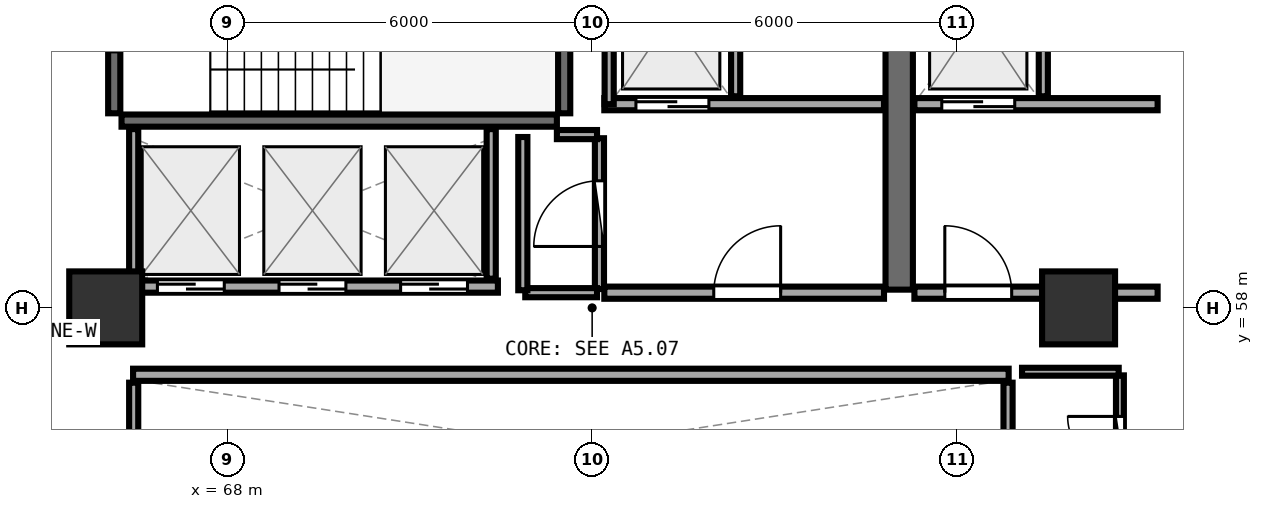
"""IFC4 building model, lengths in metres.
Left out: names, types, materials, properties, quantities, classifications, styles, units other than length and angle.
Written with IfcOpenShell. Run it as: python <this file> out.ifc"""

import sys

from ifc_helpers import new_model, si_unit, direction, frame, frame_2d, origin, origin_2d, place, context, subcontext, project, spatial, rectangle, extrude, element, fill, save


model = new_model("IFC4")
c1 = context("Model", 3, precision=1e-05, world=origin(), true_north=direction((0.0, 1.0)))
c2 = subcontext(c1, "Body", "Model", "MODEL_VIEW")
j1 = project(units=[si_unit("LENGTHUNIT", "METRE"), si_unit("PLANEANGLEUNIT", "RADIAN")], contexts=[c1])
p1 = place(None, origin())
s1 = spatial("IfcSite", under=j1, at=p1, CompositionType="ELEMENT")
p2 = place(p1, origin())
s2 = spatial("IfcBuilding", under=s1, at=p2, CompositionType="ELEMENT")
p3 = place(p2, frame((0.0, 0.0, 113.85)))
s3 = spatial("IfcBuildingStorey", under=s2, at=p3, CompositionType="ELEMENT", Elevation=113.85)
for number, where, z_axis, x_axis in (
    (1, (82.0, 58.0, 0.0), (0.0, 0.0, 1.0), (1.0, 0.0, 0.0)),
    (2, (66.0, 58.0, 0.0), (0.0, 0.0, 1.0), (1.0, 0.0, 0.0)),
):
    element("IfcColumn", number, at=place(p3, frame(where, z_axis=z_axis, x_axis=x_axis)), inside=s3, PredefinedType="PILASTER", context=c2, shape_type="SweptSolid", body=[
        extrude(rectangle(XDim=1.2, YDim=1.2, at=origin_2d()), origin(), (0.0, 0.0, 1.0), 3.75),
    ])
p4 = place(p3, frame((66.26, 61.08, 0.0), z_axis=(0.0, 0.0, 1.0), x_axis=(1.0, 0.0, 0.0)))
e3 = element("IfcWall", 3, at=p4, inside=s3, PredefinedType="SHEAR", context=c2, shape_type="SweptSolid", body=[
    extrude(rectangle(XDim=7.16, YDim=0.2, at=frame_2d((3.58, 0.0))), origin(), (0.0, 0.0, 1.0), 3.49),
])
p5 = place(p3, frame((73.54, 61.2, 0.0), z_axis=(0.0, 0.0, 1.0), x_axis=(0.0, 1.0, 0.0)))
e4 = element("IfcWall", 4, at=p5, inside=s3, PredefinedType="SHEAR", context=c2, shape_type="SweptSolid", body=[
    extrude(rectangle(XDim=3.07, YDim=0.2, at=frame_2d((1.535, 0.0))), origin(), (0.0, 0.0, 1.0), 3.49),
])
p6 = place(p3, frame((66.14, 64.27, 0.0), z_axis=(0.0, 0.0, 1.0), x_axis=(0.0, -1.0, 0.0)))
e5 = element("IfcWall", 5, at=p6, inside=s3, PredefinedType="SHEAR", context=c2, shape_type="SweptSolid", body=[
    extrude(rectangle(XDim=3.07, YDim=0.2, at=frame_2d((1.535, 0.0))), origin(), (0.0, 0.0, 1.0), 3.49),
])
p7 = place(p6, frame((1.01, 0.0, 0.0)))
e6 = element("IfcOpeningElement", 6, at=p7, cuts=e5, PredefinedType="OPENING", context=c2, shape_type="SweptSolid", body=[
    extrude(rectangle(XDim=1.05, YDim=2.1, at=frame_2d((0.525, 1.05))), frame((0.0, 0.11, 0.0), z_axis=(0.0, -1.0, 0.0), x_axis=(1.0, 0.0, 0.0)), (0.0, 0.0, 1.0), 0.22),
])
p8 = place(p3, frame((79.05, 58.3, 0.0), z_axis=(0.0, 0.0, 1.0), x_axis=(0.0, 1.0, 0.0)))
e7 = element("IfcWall", 7, at=p8, inside=s3, PredefinedType="SHEAR", context=c2, shape_type="SweptSolid", body=[
    extrude(rectangle(XDim=6.3, YDim=0.45, at=frame_2d((3.15, 0.0))), origin(), (0.0, 0.0, 1.0), 3.49),
])
p9 = place(p3, frame((74.2, 61.35, 0.0), z_axis=(0.0, 0.0, 1.0), x_axis=(1.0, 0.0, 0.0)))
e8 = element("IfcWall", 8, at=p9, inside=s3, PredefinedType="SOLIDWALL", context=c2, shape_type="SweptSolid", body=[
    extrude(rectangle(XDim=4.6, YDim=0.2, at=frame_2d((2.3, 0.0))), origin(), (0.0, 0.0, 1.0), 3.48),
])
p10 = place(p9, frame((0.52, 0.0, 0.0)))
e9 = element("IfcOpeningElement", 9, at=p10, cuts=e8, PredefinedType="OPENING", context=c2, shape_type="SweptSolid", body=[
    extrude(rectangle(XDim=1.2, YDim=2.15, at=frame_2d((0.6, 1.075))), frame((0.0, 0.11, 0.0), z_axis=(0.0, -1.0, 0.0), x_axis=(1.0, 0.0, 0.0)), (0.0, 0.0, 1.0), 0.22),
])
p11 = place(p3, frame((74.28, 61.35, 0.0), z_axis=(0.0, 0.0, 1.0), x_axis=(0.0, 1.0, 0.0)))
e10 = element("IfcWall", 10, at=p11, inside=s3, PredefinedType="PARTITIONING", context=c2, shape_type="SweptSolid", body=[
    extrude(rectangle(XDim=2.97, YDim=0.15, at=frame_2d((1.485, 0.0))), origin(), (0.0, 0.0, 1.0), 3.48),
])
p12 = place(p3, frame((76.36, 61.48, 0.0), z_axis=(0.0, 0.0, 1.0), x_axis=(0.0, 1.0, 0.0)))
e11 = element("IfcWall", 11, at=p12, inside=s3, PredefinedType="PARTITIONING", context=c2, shape_type="SweptSolid", body=[
    extrude(rectangle(XDim=2.84, YDim=0.15, at=frame_2d((1.42, 0.0))), origin(), (0.0, 0.0, 1.0), 3.48),
])
p13 = place(p3, frame((79.3, 61.35, 0.0), z_axis=(0.0, 0.0, 1.0), x_axis=(1.0, 0.0, 0.0)))
e12 = element("IfcWall", 12, at=p13, inside=s3, PredefinedType="SOLIDWALL", context=c2, shape_type="SweptSolid", body=[
    extrude(rectangle(XDim=4.0, YDim=0.2, at=frame_2d((2.0, 0.0))), origin(), (0.0, 0.0, 1.0), 2.775),
])
p14 = place(p13, frame((0.45, 0.0, 0.0)))
e13 = element("IfcOpeningElement", 13, at=p14, cuts=e12, PredefinedType="OPENING", context=c2, shape_type="SweptSolid", body=[
    extrude(rectangle(XDim=1.2, YDim=2.15, at=frame_2d((0.6, 1.075))), frame((0.0, 0.11, 0.0), z_axis=(0.0, -1.0, 0.0), x_axis=(1.0, 0.0, 0.0)), (0.0, 0.0, 1.0), 0.22),
])
p15 = place(p3, frame((81.42, 61.48, 0.0), z_axis=(0.0, 0.0, 1.0), x_axis=(0.0, 1.0, 0.0)))
e14 = element("IfcWall", 14, at=p15, inside=s3, PredefinedType="PARTITIONING", context=c2, shape_type="SweptSolid", body=[
    extrude(rectangle(XDim=2.84, YDim=0.15, at=frame_2d((1.42, 0.0))), origin(), (0.0, 0.0, 1.0), 3.48),
])
p16 = place(p3, frame((74.2, 58.25, 0.0), z_axis=(0.0, 0.0, 1.0), x_axis=(1.0, 0.0, 0.0)))
e15 = element("IfcWall", 15, at=p16, inside=s3, PredefinedType="SOLIDWALL", context=c2, shape_type="SweptSolid", body=[
    extrude(rectangle(XDim=4.6, YDim=0.2, at=frame_2d((2.3, 0.0))), origin(), (0.0, 0.0, 1.0), 3.48),
])
p17 = place(p16, frame((1.8, 0.0, 0.0)))
e16 = element("IfcOpeningElement", 16, at=p17, cuts=e15, PredefinedType="OPENING", context=c2, shape_type="SweptSolid", body=[
    extrude(rectangle(XDim=1.1, YDim=2.1, at=frame_2d((0.55, 1.05))), frame((0.0, 0.11, 0.0), z_axis=(0.0, -1.0, 0.0), x_axis=(1.0, 0.0, 0.0)), (0.0, 0.0, 1.0), 0.22),
])
p18 = place(p3, frame((79.3, 58.25, 0.0), z_axis=(0.0, 0.0, 1.0), x_axis=(1.0, 0.0, 0.0)))
e17 = element("IfcWall", 17, at=p18, inside=s3, PredefinedType="SOLIDWALL", context=c2, shape_type="SweptSolid", body=[
    extrude(rectangle(XDim=4.0, YDim=0.2, at=frame_2d((2.0, 0.0))), origin(), (0.0, 0.0, 1.0), 2.775),
])
p19 = place(p18, frame((0.5, 0.0, 0.0)))
e18 = element("IfcOpeningElement", 18, at=p19, cuts=e17, PredefinedType="OPENING", context=c2, shape_type="SweptSolid", body=[
    extrude(rectangle(XDim=1.1, YDim=2.1, at=frame_2d((0.55, 1.05))), frame((0.0, 0.11, 0.0), z_axis=(0.0, -1.0, 0.0), x_axis=(1.0, 0.0, 0.0)), (0.0, 0.0, 1.0), 0.22),
])
p20 = place(p3, frame((66.45, 58.35, 0.0), z_axis=(0.0, 0.0, 1.0), x_axis=(1.0, 0.0, 0.0)))
e19 = element("IfcWall", 19, at=p20, inside=s3, PredefinedType="SOLIDWALL", context=c2, shape_type="SweptSolid", body=[
    extrude(rectangle(XDim=6.0, YDim=0.2, at=frame_2d((3.0, 0.0))), origin(), (0.0, 0.0, 1.0), 3.48),
])
p21 = place(p20, frame((0.4, 0.0, 0.0)))
e20 = element("IfcOpeningElement", 20, at=p21, cuts=e19, PredefinedType="OPENING", context=c2, shape_type="SweptSolid", body=[
    extrude(rectangle(XDim=1.1, YDim=2.1, at=frame_2d((0.55, 1.05))), frame((0.0, 0.11, 0.0), z_axis=(0.0, -1.0, 0.0), x_axis=(1.0, 0.0, 0.0)), (0.0, 0.0, 1.0), 0.22),
])
p22 = place(p20, frame((2.4, 0.0, 0.0)))
e21 = element("IfcOpeningElement", 21, at=p22, cuts=e19, PredefinedType="OPENING", context=c2, shape_type="SweptSolid", body=[
    extrude(rectangle(XDim=1.1, YDim=2.1, at=frame_2d((0.55, 1.05))), frame((0.0, 0.11, 0.0), z_axis=(0.0, -1.0, 0.0), x_axis=(1.0, 0.0, 0.0)), (0.0, 0.0, 1.0), 0.22),
])
p23 = place(p20, frame((4.4, 0.0, 0.0)))
e22 = element("IfcOpeningElement", 22, at=p23, cuts=e19, PredefinedType="OPENING", context=c2, shape_type="SweptSolid", body=[
    extrude(rectangle(XDim=1.1, YDim=2.1, at=frame_2d((0.55, 1.05))), frame((0.0, 0.11, 0.0), z_axis=(0.0, -1.0, 0.0), x_axis=(1.0, 0.0, 0.0)), (0.0, 0.0, 1.0), 0.22),
])
for number, where, z_axis, x_axis in (
    (23, (66.46, 58.48, 0.0), (0.0, 0.0, 1.0), (0.0, 1.0, 0.0)),
    (24, (72.34, 58.48, 0.0), (0.0, 0.0, 1.0), (0.0, 1.0, 0.0)),
):
    element("IfcWall", number, at=place(p3, frame(where, z_axis=z_axis, x_axis=x_axis)), inside=s3, PredefinedType="PARTITIONING", context=c2, shape_type="SweptSolid", body=[
        extrude(rectangle(XDim=2.46, YDim=0.15, at=frame_2d((1.23, 0.0))), origin(), (0.0, 0.0, 1.0), 3.48),
    ])
p24 = place(p3, frame((66.45, 56.9, 0.0), z_axis=(0.0, 0.0, 1.0), x_axis=(1.0, 0.0, 0.0)))
e25 = element("IfcWall", 25, at=p24, inside=s3, PredefinedType="SOLIDWALL", context=c2, shape_type="SweptSolid", body=[
    extrude(rectangle(XDim=14.4, YDim=0.2, at=frame_2d((7.2, 0.0))), origin(), (0.0, 0.0, 1.0), 3.48),
])
for number, where, z_axis, x_axis in (
    (26, (66.46, 54.48, 0.0), (0.0, 0.0, 1.0), (0.0, 1.0, 0.0)),
    (27, (80.84, 54.48, 0.0), (0.0, 0.0, 1.0), (0.0, 1.0, 0.0)),
):
    element("IfcWall", number, at=place(p3, frame(where, z_axis=z_axis, x_axis=x_axis)), inside=s3, PredefinedType="PARTITIONING", context=c2, shape_type="SweptSolid", body=[
        extrude(rectangle(XDim=2.29, YDim=0.15, at=frame_2d((1.145, 0.0))), origin(), (0.0, 0.0, 1.0), 3.48),
    ])
p25 = place(p3, frame((74.12, 58.31, 0.0), z_axis=(0.0, 0.0, 1.0), x_axis=(0.0, 1.0, 0.0)))
e28 = element("IfcWall", 28, at=p25, inside=s3, PredefinedType="PARTITIONING", context=c2, shape_type="SweptSolid", body=[
    extrude(rectangle(XDim=2.48, YDim=0.15, at=frame_2d((1.24, 0.0))), origin(), (0.0, 0.0, 1.0), 3.48),
])
p26 = place(p25, frame((0.7, 0.0, 0.0)))
e29 = element("IfcOpeningElement", 29, at=p26, cuts=e28, PredefinedType="OPENING", context=c2, shape_type="SweptSolid", body=[
    extrude(rectangle(XDim=1.08, YDim=2.1, at=frame_2d((0.54, 1.05))), frame((0.0, 0.085, 0.0), z_axis=(0.0, -1.0, 0.0), x_axis=(1.0, 0.0, 0.0)), (0.0, 0.0, 1.0), 0.17),
])
p27 = place(p3, frame((82.68, 54.68, 0.0), z_axis=(0.0, 0.0, 1.0), x_axis=(0.0, 1.0, 0.0)))
e30 = element("IfcWall", 30, at=p27, inside=s3, PredefinedType="PLUMBINGWALL", context=c2, shape_type="SweptSolid", body=[
    extrude(rectangle(XDim=2.21, YDim=0.13, at=frame_2d((1.105, 0.0))), origin(), (0.0, 0.0, 1.0), 3.48),
])
p28 = place(p27, frame((0.675, 0.0, 0.0)))
e31 = element("IfcOpeningElement", 31, at=p28, cuts=e30, PredefinedType="OPENING", context=c2, shape_type="SweptSolid", body=[
    extrude(rectangle(XDim=0.86, YDim=2.05, at=frame_2d((0.43, 1.025))), frame((0.0, 0.075, 0.0), z_axis=(0.0, -1.0, 0.0), x_axis=(1.0, 0.0, 0.0)), (0.0, 0.0, 1.0), 0.15),
])
p29 = place(p3, frame((72.9, 58.25, 0.0), z_axis=(0.0, 0.0, 1.0), x_axis=(1.0, 0.0, 0.0)))
e32 = element("IfcWall", 32, at=p29, inside=s3, PredefinedType="PARTITIONING", context=c2, shape_type="SweptSolid", body=[
    extrude(rectangle(XDim=1.18, YDim=0.15, at=frame_2d((0.59, 0.0))), origin(), (0.0, 0.0, 1.0), 3.48),
])
p30 = place(p3, frame((74.08, 60.85, 0.0), z_axis=(0.0, 0.0, 1.0), x_axis=(-1.0, 0.0, 0.0)))
e33 = element("IfcWall", 33, at=p30, inside=s3, PredefinedType="PARTITIONING", context=c2, shape_type="SweptSolid", body=[
    extrude(rectangle(XDim=0.66, YDim=0.15, at=frame_2d((0.33, 0.0))), origin(), (0.0, 0.0, 1.0), 3.48),
])
p31 = place(p3, frame((72.86, 60.81, 0.0), z_axis=(0.0, 0.0, 1.0), x_axis=(0.0, -1.0, 0.0)))
e34 = element("IfcWall", 34, at=p31, inside=s3, PredefinedType="PARTITIONING", context=c2, shape_type="SweptSolid", body=[
    extrude(rectangle(XDim=2.52, YDim=0.15, at=frame_2d((1.26, 0.0))), origin(), (0.0, 0.0, 1.0), 3.48),
])
p32 = place(p3, frame((82.66, 56.95, 0.0), z_axis=(0.0, 0.0, 1.0), x_axis=(-1.0, 0.0, 0.0)))
e35 = element("IfcWall", 35, at=p32, inside=s3, PredefinedType="PLUMBINGWALL", context=c2, shape_type="SweptSolid", body=[
    extrude(rectangle(XDim=1.59, YDim=0.13, at=frame_2d((0.795, 0.0))), origin(), (0.0, 0.0, 1.0), 2.775),
])
p33 = place(p10, origin())
e36 = element("IfcDoor", 36, at=p33, inside=s3, OperationType="DOUBLE_DOOR_SLIDING", PredefinedType="DOOR", context=c2, shape_type="SweptSolid", body=[
    extrude(rectangle(XDim=1.2, YDim=2.15, at=frame_2d((0.6, 1.075))), frame((0.0, 0.025, 0.0), z_axis=(0.0, -1.0, 0.0), x_axis=(1.0, 0.0, 0.0)), (0.0, 0.0, 1.0), 0.05),
])
fill(e9, e36)
p34 = place(p14, origin())
e37 = element("IfcDoor", 37, at=p34, inside=s3, OperationType="DOUBLE_DOOR_SLIDING", PredefinedType="DOOR", context=c2, shape_type="SweptSolid", body=[
    extrude(rectangle(XDim=1.2, YDim=2.15, at=frame_2d((0.6, 1.075))), frame((0.0, 0.025, 0.0), z_axis=(0.0, -1.0, 0.0), x_axis=(1.0, 0.0, 0.0)), (0.0, 0.0, 1.0), 0.05),
])
fill(e13, e37)
p35 = place(p17, frame((1.1, 0.0, 0.0), z_axis=(0.0, 0.0, 1.0), x_axis=(-1.0, 0.0, 0.0)))
e38 = element("IfcDoor", 38, at=p35, inside=s3, OperationType="SINGLE_SWING_LEFT", PredefinedType="DOOR", context=c2, shape_type="SweptSolid", body=[
    extrude(rectangle(XDim=1.1, YDim=2.1, at=frame_2d((0.55, 1.05))), frame((0.0, 0.025, 0.0), z_axis=(0.0, -1.0, 0.0), x_axis=(1.0, 0.0, 0.0)), (0.0, 0.0, 1.0), 0.05),
])
fill(e16, e38)
p36 = place(p19, frame((1.1, 0.0, 0.0), z_axis=(0.0, 0.0, 1.0), x_axis=(-1.0, 0.0, 0.0)))
e39 = element("IfcDoor", 39, at=p36, inside=s3, OperationType="SINGLE_SWING_RIGHT", PredefinedType="DOOR", context=c2, shape_type="SweptSolid", body=[
    extrude(rectangle(XDim=1.1, YDim=2.1, at=frame_2d((0.55, 1.05))), frame((0.0, 0.025, 0.0), z_axis=(0.0, -1.0, 0.0), x_axis=(1.0, 0.0, 0.0)), (0.0, 0.0, 1.0), 0.05),
])
fill(e18, e39)
p37 = place(p21, origin())
e40 = element("IfcDoor", 40, at=p37, inside=s3, OperationType="DOUBLE_DOOR_SLIDING", PredefinedType="DOOR", context=c2, shape_type="SweptSolid", body=[
    extrude(rectangle(XDim=1.1, YDim=2.1, at=frame_2d((0.55, 1.05))), frame((0.0, 0.025, 0.0), z_axis=(0.0, -1.0, 0.0), x_axis=(1.0, 0.0, 0.0)), (0.0, 0.0, 1.0), 0.05),
])
fill(e20, e40)
p38 = place(p22, origin())
e41 = element("IfcDoor", 41, at=p38, inside=s3, OperationType="DOUBLE_DOOR_SLIDING", PredefinedType="DOOR", context=c2, shape_type="SweptSolid", body=[
    extrude(rectangle(XDim=1.1, YDim=2.1, at=frame_2d((0.55, 1.05))), frame((0.0, 0.025, 0.0), z_axis=(0.0, -1.0, 0.0), x_axis=(1.0, 0.0, 0.0)), (0.0, 0.0, 1.0), 0.05),
])
fill(e21, e41)
p39 = place(p23, origin())
e42 = element("IfcDoor", 42, at=p39, inside=s3, OperationType="DOUBLE_DOOR_SLIDING", PredefinedType="DOOR", context=c2, shape_type="SweptSolid", body=[
    extrude(rectangle(XDim=1.1, YDim=2.1, at=frame_2d((0.55, 1.05))), frame((0.0, 0.025, 0.0), z_axis=(0.0, -1.0, 0.0), x_axis=(1.0, 0.0, 0.0)), (0.0, 0.0, 1.0), 0.05),
])
fill(e22, e42)
p40 = place(p26, origin())
e43 = element("IfcDoor", 43, at=p40, inside=s3, OperationType="SINGLE_SWING_LEFT", PredefinedType="DOOR", context=c2, shape_type="SweptSolid", body=[
    extrude(rectangle(XDim=1.08, YDim=2.1, at=frame_2d((0.54, 1.05))), frame((0.0, 0.025, 0.0), z_axis=(0.0, -1.0, 0.0), x_axis=(1.0, 0.0, 0.0)), (0.0, 0.0, 1.0), 0.05),
])
fill(e29, e43)
p41 = place(p28, origin())
e44 = element("IfcDoor", 44, at=p41, inside=s3, OperationType="SINGLE_SWING_RIGHT", PredefinedType="DOOR", context=c2, shape_type="SweptSolid", body=[
    extrude(rectangle(XDim=0.86, YDim=2.05, at=frame_2d((0.43, 1.025))), frame((0.0, 0.025, 0.0), z_axis=(0.0, -1.0, 0.0), x_axis=(1.0, 0.0, 0.0)), (0.0, 0.0, 1.0), 0.05),
])
fill(e31, e44)
save(model, sys.argv[1])
